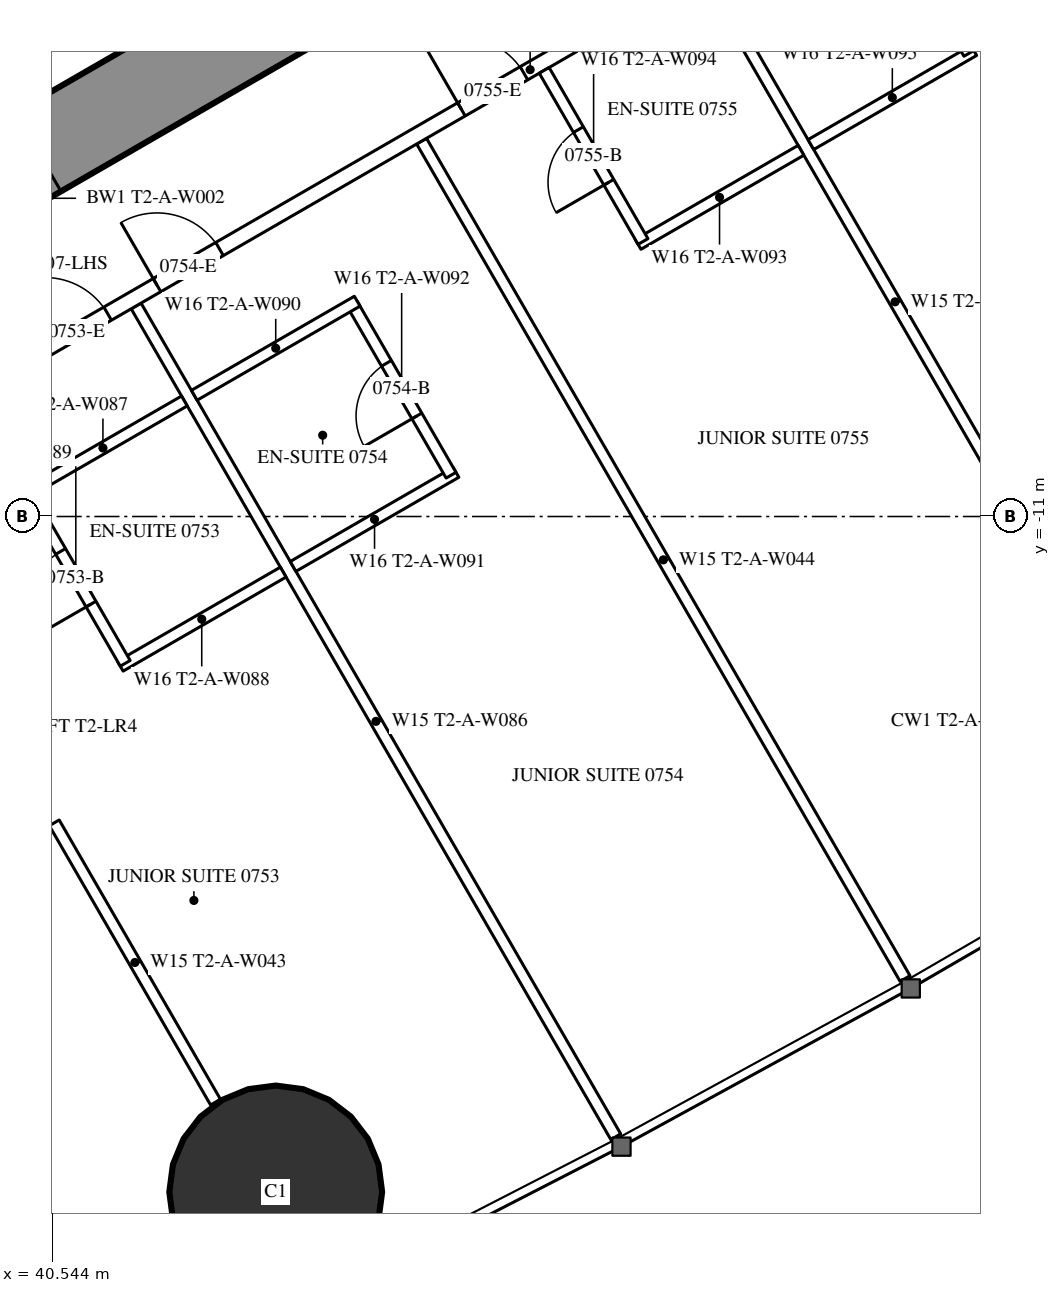
"""IFC4 building model, lengths in metres.
Left out: names, types, materials, properties, quantities, classifications, styles, units other than length and angle.
Written with IfcOpenShell. Run it as: python <this file> out.ifc"""

import sys

from ifc_helpers import new_model, si_unit, direction, frame, frame_2d, origin, origin_2d, place, context, subcontext, project, spatial, rectangle, hollow_circle, extrude, element, fill, save


model = new_model("IFC4")
c1 = context("Model", 3, precision=1e-05, world=origin(), true_north=direction((0.0, 1.0)))
c2 = subcontext(c1, "Body", "Model", "MODEL_VIEW")
j1 = project(units=[si_unit("LENGTHUNIT", "METRE"), si_unit("PLANEANGLEUNIT", "RADIAN")], contexts=[c1])
p1 = place(None, origin())
s1 = spatial("IfcSite", under=j1, at=p1, CompositionType="ELEMENT")
p2 = place(p1, origin())
s2 = spatial("IfcBuilding", under=s1, at=p2, CompositionType="ELEMENT")
p3 = place(p2, frame((0.0, 0.0, 32.0)))
s3 = spatial("IfcBuildingStorey", under=s2, at=p3, CompositionType="ELEMENT", Elevation=32.0)
p4 = place(p3, frame((43.484, -19.886, 0.0), z_axis=(0.0, 0.0, 1.0), x_axis=(1.0, 0.0, 0.0)))
e1 = element("IfcColumn", 1, at=p4, inside=s3, PredefinedType="COLUMN", context=c2, shape_type="SweptSolid", body=[
    extrude(hollow_circle(Radius=1.4, WallThickness=0.12, at=origin_2d()), origin(), (0.0, 0.0, 1.0), 3.5),
])
p5 = place(p3, frame((27.2, -13.8, 0.0), z_axis=(0.0, 0.0, 1.0), x_axis=(0.866027159892, 0.499996958321, 0.0)))
e2 = element("IfcWall", 2, at=p5, inside=s3, PredefinedType="SHEAR", context=c2, shape_type="SweptSolid", body=[
    extrude(rectangle(XDim=27.947, YDim=1.2, at=frame_2d((13.973, 0.0))), origin(), (0.0, 0.0, 1.0), 3.5),
])
p6 = place(p5, frame((4.6, 0.0, 0.0)))
e3 = element("IfcOpeningElement", 3, at=p6, cuts=e2, PredefinedType="OPENING", context=c2, shape_type="SweptSolid", body=[
    extrude(rectangle(XDim=1.0, YDim=2.2, at=frame_2d((0.5, 1.1))), frame((0.0, 0.61, 0.0), z_axis=(0.0, -1.0, 0.0), x_axis=(1.0, 0.0, 0.0)), (0.0, 0.0, 1.0), 1.22),
])
p7 = place(p5, frame((13.395, 0.0, 0.0)))
e4 = element("IfcOpeningElement", 4, at=p7, cuts=e2, PredefinedType="OPENING", context=c2, shape_type="SweptSolid", body=[
    extrude(rectangle(XDim=1.8, YDim=2.2, at=frame_2d((0.9, 1.1))), frame((0.0, 0.61, 0.0), z_axis=(0.0, -1.0, 0.0), x_axis=(1.0, 0.0, 0.0)), (0.0, 0.0, 1.0), 1.22),
])
p8 = place(p3, frame((41.647, -8.23, 0.0), z_axis=(0.0, 0.0, 1.0), x_axis=(0.49998590462, -0.866033541603, 0.0)))
e5 = element("IfcWall", 5, at=p8, inside=s3, PredefinedType="PARTITIONING", context=c2, shape_type="SweptSolid", body=[
    extrude(rectangle(XDim=12.621, YDim=0.15, at=frame_2d((6.311, 0.0))), origin(), (0.0, 0.0, 1.0), 3.25),
])
p9 = place(p3, frame((45.403, -6.062, 0.0), z_axis=(0.0, 0.0, 1.0), x_axis=(0.500007077968, -0.866021317279, 0.0)))
e6 = element("IfcWall", 6, at=p9, inside=s3, PredefinedType="PARTITIONING", context=c2, shape_type="SweptSolid", body=[
    extrude(rectangle(XDim=12.721, YDim=0.15, at=frame_2d((6.361, 0.0))), origin(), (0.0, 0.0, 1.0), 3.25),
])
p10 = place(p3, frame((49.159, -3.893, 0.0), z_axis=(0.0, 0.0, 1.0), x_axis=(0.499998773722, -0.866026111775, 0.0)))
e7 = element("IfcWall", 7, at=p10, inside=s3, PredefinedType="PARTITIONING", context=c2, shape_type="SweptSolid", body=[
    extrude(rectangle(XDim=9.892, YDim=0.15, at=frame_2d((4.946, 0.0))), origin(), (0.0, 0.0, 1.0), 2.25),
])
p11 = place(p3, frame((40.57, -15.03, 0.0), z_axis=(0.0, 0.0, 1.0), x_axis=(0.500012993597, -0.866017901798, 0.0)))
e8 = element("IfcWall", 8, at=p11, inside=s3, PredefinedType="PARTITIONING", context=c2, shape_type="SweptSolid", body=[
    extrude(rectangle(XDim=4.243, YDim=0.15, at=frame_2d((2.122, 0.0))), origin(), (0.0, 0.0, 1.0), 3.25),
])
p12 = place(p3, frame((37.96, -10.243, 0.0), z_axis=(0.0, 0.0, 1.0), x_axis=(0.866026429433, 0.499998223521, 0.0)))
e9 = element("IfcWall", 9, at=p12, inside=s3, PredefinedType="PARTITIONING", context=c2, shape_type="SweptSolid", body=[
    extrude(rectangle(XDim=20.487, YDim=0.2, at=frame_2d((10.243, 0.0))), origin(), (0.0, 0.0, 1.0), 3.25),
])
p13 = place(p12, frame((4.575, 0.0, 0.0)))
e10 = element("IfcOpeningElement", 10, at=p13, cuts=e9, PredefinedType="OPENING", context=c2, shape_type="SweptSolid", body=[
    extrude(rectangle(XDim=0.95, YDim=2.2, at=frame_2d((0.475, 1.1))), frame((0.0, 0.11, 0.0), z_axis=(0.0, -1.0, 0.0), x_axis=(1.0, 0.0, 0.0)), (0.0, 0.0, 1.0), 0.22),
])
p14 = place(p12, frame((9.199, 0.0, 0.0)))
e11 = element("IfcOpeningElement", 11, at=p14, cuts=e9, PredefinedType="OPENING", context=c2, shape_type="SweptSolid", body=[
    extrude(rectangle(XDim=0.95, YDim=2.2, at=frame_2d((0.475, 1.1))), frame((0.0, 0.11, 0.0), z_axis=(0.0, -1.0, 0.0), x_axis=(1.0, 0.0, 0.0)), (0.0, 0.0, 1.0), 0.22),
])
p15 = place(p12, frame((15.599, 0.0, 0.0)))
e12 = element("IfcOpeningElement", 12, at=p15, cuts=e9, PredefinedType="OPENING", context=c2, shape_type="SweptSolid", body=[
    extrude(rectangle(XDim=0.95, YDim=2.2, at=frame_2d((0.475, 1.1))), frame((0.0, 0.11, 0.0), z_axis=(0.0, -1.0, 0.0), x_axis=(1.0, 0.0, 0.0)), (0.0, 0.0, 1.0), 0.22),
])
p16 = place(p12, frame((2.875, 0.0, 0.0)))
e13 = element("IfcOpeningElement", 13, at=p16, cuts=e9, PredefinedType="OPENING", context=c2, shape_type="SweptSolid", body=[
    extrude(rectangle(XDim=0.95, YDim=2.2, at=frame_2d((0.475, 1.1))), frame((0.0, 0.11, 0.0), z_axis=(0.0, -1.0, 0.0), x_axis=(1.0, 0.0, 0.0)), (0.0, 0.0, 1.0), 0.22),
])
p17 = place(p3, frame((43.712, -11.657, 0.0), z_axis=(0.0, 0.0, 1.0), x_axis=(0.866006523861, 0.500032699561, 0.0)))
e14 = element("IfcWall", 14, at=p17, inside=s3, PredefinedType="PARTITIONING", context=c2, shape_type="SweptSolid", body=[
    extrude(rectangle(XDim=2.475, YDim=0.15, at=frame_2d((1.237, 0.0))), origin(), (0.0, 0.0, 1.0), 3.25),
])
p18 = place(p3, frame((44.491, -8.205, 0.0), z_axis=(0.0, 0.0, 1.0), x_axis=(0.500047596559, -0.865997922154, 0.0)))
e15 = element("IfcWall", 15, at=p18, inside=s3, PredefinedType="PARTITIONING", context=c2, shape_type="SweptSolid", body=[
    extrude(rectangle(XDim=2.6, YDim=0.15, at=frame_2d((1.3, 0.0))), origin(), (0.0, 0.0, 1.0), 3.25),
])
p19 = place(p18, frame((0.9, 0.0, 0.0)))
e16 = element("IfcOpeningElement", 16, at=p19, cuts=e15, PredefinedType="OPENING", context=c2, shape_type="SweptSolid", body=[
    extrude(rectangle(XDim=0.8, YDim=2.2, at=frame_2d((0.4, 1.1))), frame((0.0, 0.085, 0.0), z_axis=(0.0, -1.0, 0.0), x_axis=(1.0, 0.0, 0.0)), (0.0, 0.0, 1.0), 0.17),
])
for number, where, z_axis, x_axis in (
    (17, (42.412, -9.405, 0.0), (0.0, 0.0, 1.0), (0.866, 0.5, 0.0)),
    (18, (48.251, -7.42, 0.0), (0.0, 0.0, 1.0), (0.866, 0.5, 0.0)),
):
    element("IfcWall", number, at=place(p3, frame(where, z_axis=z_axis, x_axis=x_axis)), inside=s3, PredefinedType="PARTITIONING", context=c2, shape_type="SweptSolid", body=[
        extrude(rectangle(XDim=2.475, YDim=0.15, at=frame_2d((1.237, 0.0))), origin(), (0.0, 0.0, 1.0), 3.25),
    ])
p20 = place(p3, frame((47.016, -5.13, 0.0), z_axis=(0.0, 0.0, 1.0), x_axis=(0.500006934395, -0.866021400173, 0.0)))
e19 = element("IfcWall", 19, at=p20, inside=s3, PredefinedType="PARTITIONING", context=c2, shape_type="SweptSolid", body=[
    extrude(rectangle(XDim=2.6, YDim=0.15, at=frame_2d((1.3, 0.0))), origin(), (0.0, 0.0, 1.0), 3.25),
])
p21 = place(p20, frame((0.9, 0.0, 0.0)))
e20 = element("IfcOpeningElement", 20, at=p21, cuts=e19, PredefinedType="OPENING", context=c2, shape_type="SweptSolid", body=[
    extrude(rectangle(XDim=0.8, YDim=2.2, at=frame_2d((0.4, 1.1))), frame((0.0, 0.085, 0.0), z_axis=(0.0, -1.0, 0.0), x_axis=(1.0, 0.0, 0.0)), (0.0, 0.0, 1.0), 0.17),
])
p22 = place(p3, frame((50.524, -6.107, 0.0), z_axis=(0.0, 0.0, 1.0), x_axis=(0.866031185235, 0.4999899861, 0.0)))
e21 = element("IfcWall", 21, at=p22, inside=s3, PredefinedType="PARTITIONING", context=c2, shape_type="SweptSolid", body=[
    extrude(rectangle(XDim=2.475, YDim=0.15, at=frame_2d((1.238, 0.0))), origin(), (0.0, 0.0, 1.0), 3.25),
])
p23 = place(p3, frame((51.303, -2.656, 0.0), z_axis=(0.0, 0.0, 1.0), x_axis=(0.500047596559, -0.865997922154, 0.0)))
e22 = element("IfcWall", 22, at=p23, inside=s3, PredefinedType="PARTITIONING", context=c2, shape_type="SweptSolid", body=[
    extrude(rectangle(XDim=2.6, YDim=0.15, at=frame_2d((1.3, 0.0))), origin(), (0.0, 0.0, 1.0), 3.25),
])
p24 = place(p23, frame((0.9, 0.0, 0.0)))
e23 = element("IfcOpeningElement", 23, at=p24, cuts=e22, PredefinedType="OPENING", context=c2, shape_type="SweptSolid", body=[
    extrude(rectangle(XDim=0.8, YDim=2.2, at=frame_2d((0.4, 1.1))), frame((0.0, 0.085, 0.0), z_axis=(0.0, -1.0, 0.0), x_axis=(1.0, 0.0, 0.0)), (0.0, 0.0, 1.0), 0.17),
])
p25 = place(p3, frame((41.439, -12.969, 0.0), z_axis=(0.0, 0.0, 1.0), x_axis=(0.866031185235, 0.4999899861, 0.0)))
e24 = element("IfcWall", 24, at=p25, inside=s3, PredefinedType="PARTITIONING", context=c2, shape_type="SweptSolid", body=[
    extrude(rectangle(XDim=2.475, YDim=0.15, at=frame_2d((1.238, 0.0))), origin(), (0.0, 0.0, 1.0), 3.25),
])
p26 = place(p3, frame((40.204, -10.68, 0.0), z_axis=(0.0, 0.0, 1.0), x_axis=(0.500006934395, -0.866021400173, 0.0)))
e25 = element("IfcWall", 25, at=p26, inside=s3, PredefinedType="PARTITIONING", context=c2, shape_type="SweptSolid", body=[
    extrude(rectangle(XDim=2.6, YDim=0.15, at=frame_2d((1.3, 0.0))), origin(), (0.0, 0.0, 1.0), 3.25),
])
p27 = place(p26, frame((0.9, 0.0, 0.0)))
e26 = element("IfcOpeningElement", 26, at=p27, cuts=e25, PredefinedType="OPENING", context=c2, shape_type="SweptSolid", body=[
    extrude(rectangle(XDim=0.8, YDim=2.2, at=frame_2d((0.4, 1.1))), frame((0.0, 0.085, 0.0), z_axis=(0.0, -1.0, 0.0), x_axis=(1.0, 0.0, 0.0)), (0.0, 0.0, 1.0), 0.17),
])
p28 = place(p3, frame((40.139, -10.718, 0.0), z_axis=(0.0, 0.0, 1.0), x_axis=(0.866031185235, 0.4999899861, 0.0)))
e27 = element("IfcWall", 27, at=p28, inside=s3, PredefinedType="PARTITIONING", context=c2, shape_type="SweptSolid", body=[
    extrude(rectangle(XDim=2.475, YDim=0.15, at=frame_2d((1.238, 0.0))), origin(), (0.0, 0.0, 1.0), 3.25),
])
p29 = place(p19, origin())
e28 = element("IfcDoor", 28, at=p29, inside=s3, OperationType="SINGLE_SWING_RIGHT", PredefinedType="DOOR", context=c2, shape_type="SweptSolid", body=[
    extrude(rectangle(XDim=0.8, YDim=2.2, at=frame_2d((0.4, 1.1))), frame((0.0, 0.025, 0.0), z_axis=(0.0, -1.0, 0.0), x_axis=(1.0, 0.0, 0.0)), (0.0, 0.0, 1.0), 0.05),
])
fill(e16, e28)
p30 = place(p13, origin())
e29 = element("IfcDoor", 29, at=p30, inside=s3, OperationType="SINGLE_SWING_LEFT", PredefinedType="DOOR", context=c2, shape_type="SweptSolid", body=[
    extrude(rectangle(XDim=0.95, YDim=2.2, at=frame_2d((0.475, 1.1))), frame((0.0, 0.025, 0.0), z_axis=(0.0, -1.0, 0.0), x_axis=(1.0, 0.0, 0.0)), (0.0, 0.0, 1.0), 0.05),
])
fill(e10, e29)
p31 = place(p21, origin())
e30 = element("IfcDoor", 30, at=p31, inside=s3, OperationType="SINGLE_SWING_RIGHT", PredefinedType="DOOR", context=c2, shape_type="SweptSolid", body=[
    extrude(rectangle(XDim=0.8, YDim=2.2, at=frame_2d((0.4, 1.1))), frame((0.0, 0.025, 0.0), z_axis=(0.0, -1.0, 0.0), x_axis=(1.0, 0.0, 0.0)), (0.0, 0.0, 1.0), 0.05),
])
fill(e20, e30)
p32 = place(p14, origin())
e31 = element("IfcDoor", 31, at=p32, inside=s3, OperationType="SINGLE_SWING_LEFT", PredefinedType="DOOR", context=c2, shape_type="SweptSolid", body=[
    extrude(rectangle(XDim=0.95, YDim=2.2, at=frame_2d((0.475, 1.1))), frame((0.0, 0.025, 0.0), z_axis=(0.0, -1.0, 0.0), x_axis=(1.0, 0.0, 0.0)), (0.0, 0.0, 1.0), 0.05),
])
fill(e11, e31)
p33 = place(p27, origin())
e32 = element("IfcDoor", 32, at=p33, inside=s3, OperationType="SINGLE_SWING_RIGHT", PredefinedType="DOOR", context=c2, shape_type="SweptSolid", body=[
    extrude(rectangle(XDim=0.8, YDim=2.2, at=frame_2d((0.4, 1.1))), frame((0.0, 0.025, 0.0), z_axis=(0.0, -1.0, 0.0), x_axis=(1.0, 0.0, 0.0)), (0.0, 0.0, 1.0), 0.05),
])
fill(e26, e32)
p34 = place(p16, origin())
e33 = element("IfcDoor", 33, at=p34, inside=s3, OperationType="SINGLE_SWING_LEFT", PredefinedType="DOOR", context=c2, shape_type="SweptSolid", body=[
    extrude(rectangle(XDim=0.95, YDim=2.2, at=frame_2d((0.475, 1.1))), frame((0.0, 0.025, 0.0), z_axis=(0.0, -1.0, 0.0), x_axis=(1.0, 0.0, 0.0)), (0.0, 0.0, 1.0), 0.05),
])
fill(e13, e33)
save(model, sys.argv[1])
